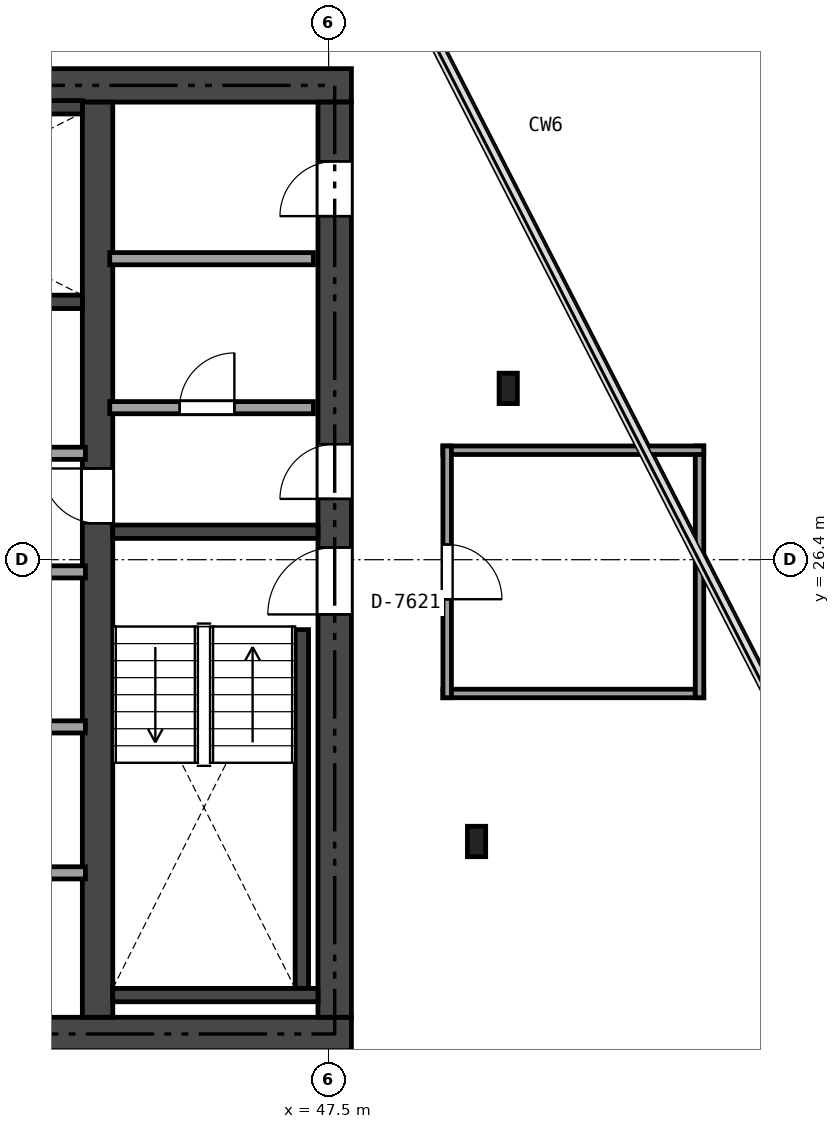
"""IFC4 building model, lengths in metres.
Left out: names, types, materials, properties, quantities, classifications, styles, units other than length and angle.
Written with IfcOpenShell. Run it as: python <this file> out.ifc"""

import sys

from ifc_helpers import new_model, si_unit, direction, frame, frame_2d, origin, origin_2d, place, context, subcontext, project, spatial, rectangle, i_section, extrude, element, fill, save


model = new_model("IFC4")
c1 = context("Model", 3, precision=1e-05, world=origin(), true_north=direction((0.0, 1.0)))
c2 = subcontext(c1, "Body", "Model", "MODEL_VIEW")
j1 = project(units=[si_unit("LENGTHUNIT", "METRE"), si_unit("PLANEANGLEUNIT", "RADIAN")], contexts=[c1])
p1 = place(None, origin())
s1 = spatial("IfcSite", under=j1, at=p1, CompositionType="ELEMENT")
p2 = place(p1, origin())
s2 = spatial("IfcBuilding", under=s1, at=p2, CompositionType="ELEMENT")
p3 = place(p2, frame((0.0, 0.0, 283.5)))
s3 = spatial("IfcBuildingStorey", under=s2, at=p3, CompositionType="ELEMENT", Elevation=283.5)
p4 = place(p3, frame((26.525, 18.6, 0.0), z_axis=(0.0, 0.0, 1.0), x_axis=(1.0, 0.0, 0.0)))
e1 = element("IfcWall", 1, at=p4, inside=s3, PredefinedType="SHEAR", context=c2, shape_type="SweptSolid", body=[
    extrude(rectangle(XDim=21.35, YDim=0.55, at=frame_2d((10.675, 0.0))), origin(), (0.0, 0.0, 1.0), 2.84),
])
p5 = place(p4, frame((12.4, 0.0, 0.0)))
e2 = element("IfcOpeningElement", 2, at=p5, cuts=e1, PredefinedType="OPENING", context=c2, shape_type="SweptSolid", body=[
    extrude(rectangle(XDim=1.15, YDim=2.15, at=frame_2d((0.575, 1.075))), frame((0.0, 0.285, 0.0), z_axis=(0.0, -1.0, 0.0), x_axis=(1.0, 0.0, 0.0)), (0.0, 0.0, 1.0), 0.57),
])
p6 = place(p4, frame((5.225, 0.0, 0.0)))
e3 = element("IfcOpeningElement", 3, at=p6, cuts=e1, PredefinedType="OPENING", context=c2, shape_type="SweptSolid", body=[
    extrude(rectangle(XDim=0.9, YDim=2.1, at=frame_2d((0.45, 1.05))), frame((0.0, 0.285, 0.0), z_axis=(0.0, -1.0, 0.0), x_axis=(1.0, 0.0, 0.0)), (0.0, 0.0, 1.0), 0.57),
])
p7 = place(p3, frame((26.525, 34.2, 0.0), z_axis=(0.0, 0.0, 1.0), x_axis=(1.0, 0.0, 0.0)))
e4 = element("IfcWall", 4, at=p7, inside=s3, PredefinedType="SHEAR", context=c2, shape_type="SweptSolid", body=[
    extrude(rectangle(XDim=21.35, YDim=0.55, at=frame_2d((10.675, 0.0))), origin(), (0.0, 0.0, 1.0), 2.84),
])
p8 = place(p7, frame((9.675, 0.0, 0.0)))
e5 = element("IfcOpeningElement", 5, at=p8, cuts=e4, PredefinedType="OPENING", context=c2, shape_type="SweptSolid", body=[
    extrude(rectangle(XDim=1.1, YDim=2.15, at=frame_2d((0.55, 1.075))), frame((0.0, 0.285, 0.0), z_axis=(0.0, -1.0, 0.0), x_axis=(1.0, 0.0, 0.0)), (0.0, 0.0, 1.0), 0.57),
])
p9 = place(p7, frame((1.925, 0.0, 0.0)))
e6 = element("IfcOpeningElement", 6, at=p9, cuts=e4, PredefinedType="OPENING", context=c2, shape_type="SweptSolid", body=[
    extrude(rectangle(XDim=0.9, YDim=2.1, at=frame_2d((0.45, 1.05))), frame((0.0, 0.285, 0.0), z_axis=(0.0, -1.0, 0.0), x_axis=(1.0, 0.0, 0.0)), (0.0, 0.0, 1.0), 0.57),
])
p10 = place(p7, frame((6.225, 0.0, 0.0)))
e7 = element("IfcOpeningElement", 7, at=p10, cuts=e4, PredefinedType="OPENING", context=c2, shape_type="SweptSolid", body=[
    extrude(rectangle(XDim=0.9, YDim=2.1, at=frame_2d((0.45, 1.05))), frame((0.0, 0.285, 0.0), z_axis=(0.0, -1.0, 0.0), x_axis=(1.0, 0.0, 0.0)), (0.0, 0.0, 1.0), 0.57),
])
p11 = place(p3, frame((47.6, 18.875, 0.0), z_axis=(0.0, 0.0, 1.0), x_axis=(0.0, 1.0, 0.0)))
e8 = element("IfcWall", 8, at=p11, inside=s3, PredefinedType="SHEAR", context=c2, shape_type="SweptSolid", body=[
    extrude(rectangle(XDim=15.05, YDim=0.55, at=frame_2d((7.525, 0.0))), origin(), (0.0, 0.0, 1.0), 2.84),
])
p12 = place(p11, frame((6.625, 0.0, 0.0)))
e9 = element("IfcOpeningElement", 9, at=p12, cuts=e8, PredefinedType="OPENING", context=c2, shape_type="SweptSolid", body=[
    extrude(rectangle(XDim=1.1, YDim=2.15, at=frame_2d((0.55, 1.075))), frame((0.0, 0.285, 0.0), z_axis=(0.0, -1.0, 0.0), x_axis=(1.0, 0.0, 0.0)), (0.0, 0.0, 1.0), 0.57),
])
p13 = place(p11, frame((8.525, 0.0, 0.0)))
e10 = element("IfcOpeningElement", 10, at=p13, cuts=e8, PredefinedType="OPENING", context=c2, shape_type="SweptSolid", body=[
    extrude(rectangle(XDim=0.9, YDim=2.1, at=frame_2d((0.45, 1.05))), frame((0.0, 0.285, 0.0), z_axis=(0.0, -1.0, 0.0), x_axis=(1.0, 0.0, 0.0)), (0.0, 0.0, 1.0), 0.57),
])
p14 = place(p11, frame((13.175, 0.0, 0.0)))
e11 = element("IfcOpeningElement", 11, at=p14, cuts=e8, PredefinedType="OPENING", context=c2, shape_type="SweptSolid", body=[
    extrude(rectangle(XDim=0.9, YDim=2.1, at=frame_2d((0.45, 1.05))), frame((0.0, 0.285, 0.0), z_axis=(0.0, -1.0, 0.0), x_axis=(1.0, 0.0, 0.0)), (0.0, 0.0, 1.0), 0.57),
])
p15 = place(p3, frame((43.7, 18.875, 0.0), z_axis=(0.0, 0.0, 1.0), x_axis=(0.0, 1.0, 0.0)))
e12 = element("IfcWall", 12, at=p15, inside=s3, PredefinedType="SHEAR", context=c2, shape_type="SweptSolid", body=[
    extrude(rectangle(XDim=15.05, YDim=0.5, at=frame_2d((7.525, 0.0))), origin(), (0.0, 0.0, 1.0), 2.84),
])
p16 = place(p15, frame((8.125, 0.0, 0.0)))
e13 = element("IfcOpeningElement", 13, at=p16, cuts=e12, PredefinedType="OPENING", context=c2, shape_type="SweptSolid", body=[
    extrude(rectangle(XDim=0.9, YDim=2.1, at=frame_2d((0.45, 1.05))), frame((0.0, 0.26, 0.0), z_axis=(0.0, -1.0, 0.0), x_axis=(1.0, 0.0, 0.0)), (0.0, 0.0, 1.0), 0.52),
])
p17 = place(p3, frame((43.95, 26.86, 0.0), z_axis=(0.0, 0.0, 1.0), x_axis=(1.0, 0.0, 0.0)))
e14 = element("IfcWall", 14, at=p17, inside=s3, PredefinedType="SHEAR", context=c2, shape_type="SweptSolid", body=[
    extrude(rectangle(XDim=3.375, YDim=0.22, at=frame_2d((1.688, 0.0))), origin(), (0.0, 0.0, 1.0), 2.84),
])
p18 = place(p3, frame((47.06, 19.35, 0.0), z_axis=(0.0, 0.0, 1.0), x_axis=(0.0, 1.0, 0.0)))
e15 = element("IfcWall", 15, at=p18, inside=s3, PredefinedType="SHEAR", context=c2, shape_type="SweptSolid", body=[
    extrude(rectangle(XDim=5.9, YDim=0.22, at=frame_2d((2.95, 0.0))), origin(), (0.0, 0.0, 1.0), 2.84),
])
p19 = place(p3, frame((43.95, 19.24, 0.0), z_axis=(0.0, 0.0, 1.0), x_axis=(1.0, 0.0, 0.0)))
e16 = element("IfcWall", 16, at=p19, inside=s3, PredefinedType="SHEAR", context=c2, shape_type="SweptSolid", body=[
    extrude(rectangle(XDim=3.375, YDim=0.22, at=frame_2d((1.688, 0.0))), origin(), (0.0, 0.0, 1.0), 2.84),
])
p20 = place(p3, frame((35.84, 30.64, 0.0), z_axis=(0.0, 0.0, 1.0), x_axis=(1.0, 0.0, 0.0)))
e17 = element("IfcWall", 17, at=p20, inside=s3, PredefinedType="SHEAR", context=c2, shape_type="SweptSolid", body=[
    extrude(rectangle(XDim=7.61, YDim=0.22, at=frame_2d((3.805, 0.0))), origin(), (0.0, 0.0, 1.0), 2.84),
])
p21 = place(p3, frame((37.55, 33.84, 0.0), z_axis=(0.0, 0.0, 1.0), x_axis=(1.0, 0.0, 0.0)))
e18 = element("IfcWall", 18, at=p21, inside=s3, PredefinedType="SHEAR", context=c2, shape_type="SweptSolid", body=[
    extrude(rectangle(XDim=5.9, YDim=0.22, at=frame_2d((2.95, 0.0))), origin(), (0.0, 0.0, 1.0), 2.84),
])
for number, where, z_axis, x_axis in (
    (19, (50.454, 29.217, 0.0), (0.0, 0.0, 1.0), (1.0, 0.0, 0.0)),
    (20, (49.933, 21.766, 0.0), (0.0, 0.0, 1.0), (1.0, 0.0, 0.0)),
):
    element("IfcColumn", number, at=place(p3, frame(where, z_axis=z_axis, x_axis=x_axis)), inside=s3, PredefinedType="COLUMN", context=c2, shape_type="SweptSolid", body=[
        extrude(i_section(OverallWidth=0.3, OverallDepth=0.5, WebThickness=0.015, FlangeThickness=0.028, at=origin_2d()), origin(), (0.0, 0.0, 1.0), 2.84),
    ])
p22 = place(p3, frame((43.9, 28.9, 0.0), z_axis=(0.0, 0.0, 1.0), x_axis=(1.0, 0.0, 0.0)))
e21 = element("IfcWall", 21, at=p22, inside=s3, PredefinedType="SOLIDWALL", context=c2, shape_type="SweptSolid", body=[
    extrude(rectangle(XDim=3.35, YDim=0.2, at=frame_2d((1.675, 0.0))), origin(), (0.0, 0.0, 1.0), 2.84),
])
p23 = place(p22, frame((1.15, 0.0, 0.0)))
e22 = element("IfcOpeningElement", 22, at=p23, cuts=e21, PredefinedType="OPENING", context=c2, shape_type="SweptSolid", body=[
    extrude(rectangle(XDim=0.9, YDim=2.1, at=frame_2d((0.45, 1.05))), frame((0.0, 0.11, 0.0), z_axis=(0.0, -1.0, 0.0), x_axis=(1.0, 0.0, 0.0)), (0.0, 0.0, 1.0), 0.22),
])
p24 = place(p3, frame((43.9, 31.35, 0.0), z_axis=(0.0, 0.0, 1.0), x_axis=(1.0, 0.0, 0.0)))
e23 = element("IfcWall", 23, at=p24, inside=s3, PredefinedType="SOLIDWALL", context=c2, shape_type="SweptSolid", body=[
    extrude(rectangle(XDim=3.35, YDim=0.2, at=frame_2d((1.675, 0.0))), origin(), (0.0, 0.0, 1.0), 2.84),
])
p25 = place(p3, frame((35.62, 28.15, 0.0), z_axis=(0.0, 0.0, 1.0), x_axis=(1.0, 0.0, 0.0)))
e24 = element("IfcWall", 24, at=p25, inside=s3, PredefinedType="SOLIDWALL", context=c2, shape_type="SweptSolid", body=[
    extrude(rectangle(XDim=7.88, YDim=0.2, at=frame_2d((3.94, 0.0))), origin(), (0.0, 0.0, 1.0), 2.84),
])
p26 = place(p3, frame((35.62, 26.2, 0.0), z_axis=(0.0, 0.0, 1.0), x_axis=(1.0, 0.0, 0.0)))
e25 = element("IfcWall", 25, at=p26, inside=s3, PredefinedType="SOLIDWALL", context=c2, shape_type="SweptSolid", body=[
    extrude(rectangle(XDim=7.88, YDim=0.2, at=frame_2d((3.94, 0.0))), origin(), (0.0, 0.0, 1.0), 2.84),
])
p27 = place(p26, frame((1.13, 0.0, 0.0)))
e26 = element("IfcOpeningElement", 26, at=p27, cuts=e25, PredefinedType="OPENING", context=c2, shape_type="SweptSolid", body=[
    extrude(rectangle(XDim=0.9, YDim=2.1, at=frame_2d((0.45, 1.05))), frame((0.0, 0.11, 0.0), z_axis=(0.0, -1.0, 0.0), x_axis=(1.0, 0.0, 0.0)), (0.0, 0.0, 1.0), 0.22),
])
p28 = place(p26, frame((5.73, 0.0, 0.0)))
e27 = element("IfcOpeningElement", 27, at=p28, cuts=e25, PredefinedType="OPENING", context=c2, shape_type="SweptSolid", body=[
    extrude(rectangle(XDim=0.9, YDim=2.1, at=frame_2d((0.45, 1.05))), frame((0.0, 0.11, 0.0), z_axis=(0.0, -1.0, 0.0), x_axis=(1.0, 0.0, 0.0)), (0.0, 0.0, 1.0), 0.22),
])
p29 = place(p3, frame((35.62, 23.65, 0.0), z_axis=(0.0, 0.0, 1.0), x_axis=(1.0, 0.0, 0.0)))
e28 = element("IfcWall", 28, at=p29, inside=s3, PredefinedType="SOLIDWALL", context=c2, shape_type="SweptSolid", body=[
    extrude(rectangle(XDim=7.88, YDim=0.2, at=frame_2d((3.94, 0.0))), origin(), (0.0, 0.0, 1.0), 2.361),
])
p30 = place(p3, frame((35.62, 21.25, 0.0), z_axis=(0.0, 0.0, 1.0), x_axis=(1.0, 0.0, 0.0)))
e29 = element("IfcWall", 29, at=p30, inside=s3, PredefinedType="SOLIDWALL", context=c2, shape_type="SweptSolid", body=[
    extrude(rectangle(XDim=7.88, YDim=0.2, at=frame_2d((3.94, 0.0))), origin(), (0.0, 0.0, 1.0), 2.84),
])
p31 = place(p30, frame((1.13, 0.0, 0.0)))
e30 = element("IfcOpeningElement", 30, at=p31, cuts=e29, PredefinedType="OPENING", context=c2, shape_type="SweptSolid", body=[
    extrude(rectangle(XDim=0.9, YDim=2.1, at=frame_2d((0.45, 1.05))), frame((0.0, 0.11, 0.0), z_axis=(0.0, -1.0, 0.0), x_axis=(1.0, 0.0, 0.0)), (0.0, 0.0, 1.0), 0.22),
])
p32 = place(p30, frame((5.73, 0.0, 0.0)))
e31 = element("IfcOpeningElement", 31, at=p32, cuts=e29, PredefinedType="OPENING", context=c2, shape_type="SweptSolid", body=[
    extrude(rectangle(XDim=0.9, YDim=2.1, at=frame_2d((0.45, 1.05))), frame((0.0, 0.11, 0.0), z_axis=(0.0, -1.0, 0.0), x_axis=(1.0, 0.0, 0.0)), (0.0, 0.0, 1.0), 0.22),
])
p33 = place(p3, frame((49.38, 24.2, 0.0), z_axis=(0.0, 0.0, 1.0), x_axis=(1.0, 0.0, 0.0)))
e32 = element("IfcWall", 32, at=p33, inside=s3, PredefinedType="PARTITIONING", context=c2, shape_type="SweptSolid", body=[
    extrude(rectangle(XDim=4.29, YDim=0.14, at=frame_2d((2.145, 0.0))), origin(), (0.0, 0.0, 1.0), 2.365),
])
p34 = place(p3, frame((53.6, 24.13, 0.0), z_axis=(0.0, 0.0, 1.0), x_axis=(0.0, 1.0, 0.0)))
e33 = element("IfcWall", 33, at=p34, inside=s3, PredefinedType="PARTITIONING", context=c2, shape_type="SweptSolid", body=[
    extrude(rectangle(XDim=4.14, YDim=0.14, at=frame_2d((2.07, 0.0))), origin(), (0.0, 0.0, 1.0), 2.84),
])
p35 = place(p3, frame((53.67, 28.2, 0.0), z_axis=(0.0, 0.0, 1.0), x_axis=(-1.0, 0.0, 0.0)))
e34 = element("IfcWall", 34, at=p35, inside=s3, PredefinedType="PARTITIONING", context=c2, shape_type="SweptSolid", body=[
    extrude(rectangle(XDim=4.29, YDim=0.14, at=frame_2d((2.145, 0.0))), origin(), (0.0, 0.0, 1.0), 2.365),
])
p36 = place(p3, frame((49.45, 28.27, 0.0), z_axis=(0.0, 0.0, 1.0), x_axis=(0.0, -1.0, 0.0)))
e35 = element("IfcWall", 35, at=p36, inside=s3, PredefinedType="PARTITIONING", context=c2, shape_type="SweptSolid", body=[
    extrude(rectangle(XDim=4.14, YDim=0.14, at=frame_2d((2.07, 0.0))), origin(), (0.0, 0.0, 1.0), 2.84),
])
p37 = place(p36, frame((1.62, 0.0, 0.0)))
e36 = element("IfcOpeningElement", 36, at=p37, cuts=e35, PredefinedType="OPENING", context=c2, shape_type="SweptSolid", body=[
    extrude(rectangle(XDim=0.9, YDim=2.0, at=frame_2d((0.45, 1.0))), frame((0.0, 0.08, 0.0), z_axis=(0.0, -1.0, 0.0), x_axis=(1.0, 0.0, 0.0)), (0.0, 0.0, 1.0), 0.16),
])
p38 = place(p12, origin())
e37 = element("IfcDoor", 37, at=p38, inside=s3, OperationType="SINGLE_SWING_LEFT", PredefinedType="DOOR", context=c2, shape_type="SweptSolid", body=[
    extrude(rectangle(XDim=1.1, YDim=2.15, at=frame_2d((0.55, 1.075))), frame((0.0, 0.025, 0.0), z_axis=(0.0, -1.0, 0.0), x_axis=(1.0, 0.0, 0.0)), (0.0, 0.0, 1.0), 0.05),
])
fill(e9, e37)
p39 = place(p16, origin())
e38 = element("IfcDoor", 38, at=p39, inside=s3, OperationType="SINGLE_SWING_RIGHT", PredefinedType="DOOR", context=c2, shape_type="SweptSolid", body=[
    extrude(rectangle(XDim=0.9, YDim=2.1, at=frame_2d((0.45, 1.05))), frame((0.0, 0.025, 0.0), z_axis=(0.0, -1.0, 0.0), x_axis=(1.0, 0.0, 0.0)), (0.0, 0.0, 1.0), 0.05),
])
fill(e13, e38)
p40 = place(p13, origin())
e39 = element("IfcDoor", 39, at=p40, inside=s3, OperationType="SINGLE_SWING_LEFT", PredefinedType="DOOR", context=c2, shape_type="SweptSolid", body=[
    extrude(rectangle(XDim=0.9, YDim=2.1, at=frame_2d((0.45, 1.05))), frame((0.0, 0.025, 0.0), z_axis=(0.0, -1.0, 0.0), x_axis=(1.0, 0.0, 0.0)), (0.0, 0.0, 1.0), 0.05),
])
fill(e10, e39)
p41 = place(p23, origin())
e40 = element("IfcDoor", 40, at=p41, inside=s3, OperationType="SINGLE_SWING_RIGHT", PredefinedType="DOOR", context=c2, shape_type="SweptSolid", body=[
    extrude(rectangle(XDim=0.9, YDim=2.1, at=frame_2d((0.45, 1.05))), frame((0.0, 0.025, 0.0), z_axis=(0.0, -1.0, 0.0), x_axis=(1.0, 0.0, 0.0)), (0.0, 0.0, 1.0), 0.05),
])
fill(e22, e40)
p42 = place(p14, origin())
e41 = element("IfcDoor", 41, at=p42, inside=s3, OperationType="SINGLE_SWING_LEFT", PredefinedType="DOOR", context=c2, shape_type="SweptSolid", body=[
    extrude(rectangle(XDim=0.9, YDim=2.1, at=frame_2d((0.45, 1.05))), frame((0.0, 0.025, 0.0), z_axis=(0.0, -1.0, 0.0), x_axis=(1.0, 0.0, 0.0)), (0.0, 0.0, 1.0), 0.05),
])
fill(e11, e41)
p43 = place(p37, origin())
e42 = element("IfcDoor", 42, at=p43, inside=s3, OperationType="SINGLE_SWING_RIGHT", PredefinedType="DOOR", context=c2, shape_type="SweptSolid", body=[
    extrude(rectangle(XDim=0.9, YDim=2.0, at=frame_2d((0.45, 1.0))), frame((0.0, 0.025, 0.0), z_axis=(0.0, -1.0, 0.0), x_axis=(1.0, 0.0, 0.0)), (0.0, 0.0, 1.0), 0.05),
])
fill(e36, e42)
save(model, sys.argv[1])
